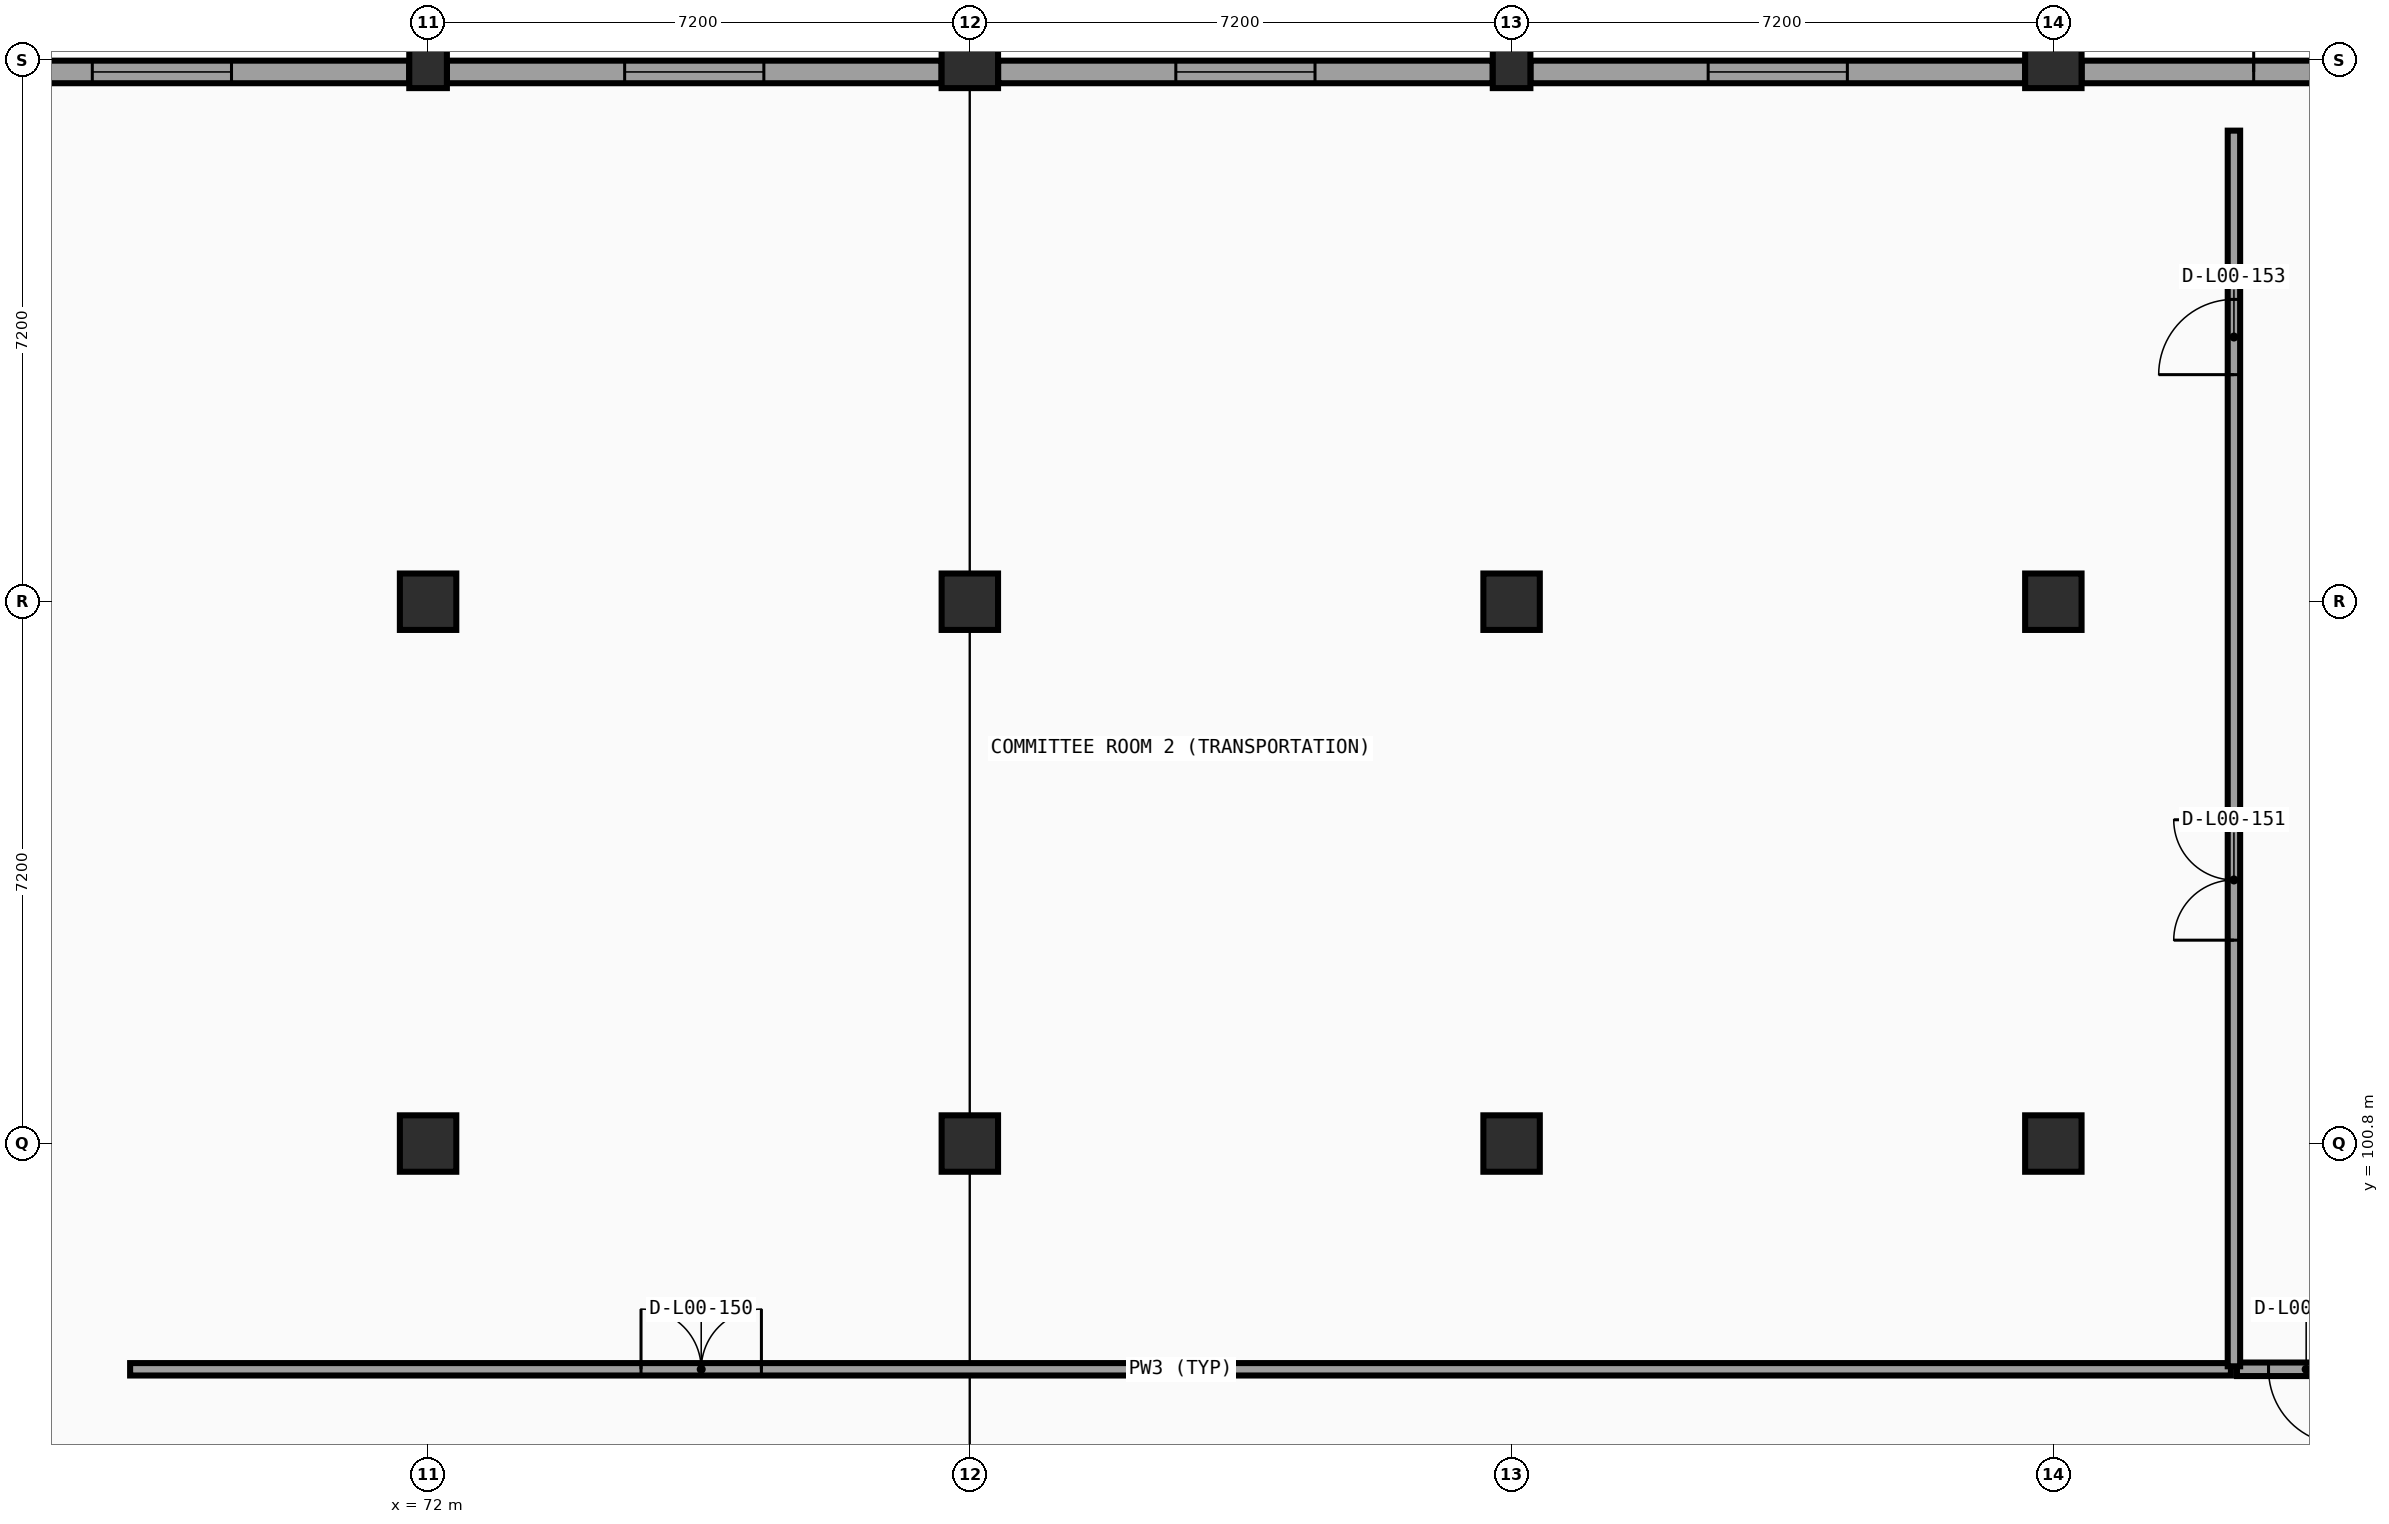
"""IFC4 building model, lengths in metres.
Left out: names, types, materials, properties, quantities, classifications, styles, units other than length and angle.
Written with IfcOpenShell. Run it as: python <this file> out.ifc"""

import sys

from ifc_helpers import new_model, si_unit, direction, frame, frame_2d, origin, origin_2d, place, context, subcontext, project, spatial, rectangle, extrude, element, fill, save


model = new_model("IFC4")
c1 = context("Model", 3, precision=1e-05, world=origin(), true_north=direction((0.0, 1.0)))
c2 = subcontext(c1, "Body", "Model", "MODEL_VIEW")
j1 = project(units=[si_unit("LENGTHUNIT", "METRE"), si_unit("PLANEANGLEUNIT", "RADIAN")], contexts=[c1])
p1 = place(None, origin())
s1 = spatial("IfcSite", under=j1, at=p1, CompositionType="ELEMENT")
p2 = place(p1, origin())
s2 = spatial("IfcBuilding", under=s1, at=p2, CompositionType="ELEMENT")
p3 = place(p2, origin())
s3 = spatial("IfcBuildingStorey", under=s2, at=p3, CompositionType="ELEMENT", Elevation=0.0)
for number, where, z_axis, x_axis in (
    (1, (72.0, 100.8, 0.0), (0.0, 0.0, 1.0), (1.0, 0.0, 0.0)),
    (2, (72.0, 108.0, 0.0), (0.0, 0.0, 1.0), (1.0, 0.0, 0.0)),
):
    element("IfcColumn", number, at=place(p3, frame(where, z_axis=z_axis, x_axis=x_axis)), inside=s3, PredefinedType="COLUMN", context=c2, shape_type="SweptSolid", body=[
        extrude(rectangle(XDim=0.75, YDim=0.75, at=origin_2d()), origin(), (0.0, 0.0, 1.0), 5.4),
    ])
p4 = place(p3, frame((72.0, 115.2, 0.0), z_axis=(0.0, 0.0, 1.0), x_axis=(1.0, 0.0, 0.0)))
e3 = element("IfcColumn", 3, at=p4, inside=s3, PredefinedType="PILASTER", context=c2, shape_type="SweptSolid", body=[
    extrude(rectangle(XDim=0.5, YDim=0.75, at=origin_2d()), origin(), (0.0, 0.0, 1.0), 5.4),
])
for number, where, z_axis, x_axis in (
    (4, (79.2, 100.8, 0.0), (0.0, 0.0, 1.0), (1.0, 0.0, 0.0)),
    (5, (79.2, 108.0, 0.0), (0.0, 0.0, 1.0), (1.0, 0.0, 0.0)),
    (6, (79.2, 115.2, 0.0), (0.0, 0.0, 1.0), (1.0, 0.0, 0.0)),
    (7, (86.4, 100.8, 0.0), (0.0, 0.0, 1.0), (1.0, 0.0, 0.0)),
    (8, (86.4, 108.0, 0.0), (0.0, 0.0, 1.0), (1.0, 0.0, 0.0)),
):
    element("IfcColumn", number, at=place(p3, frame(where, z_axis=z_axis, x_axis=x_axis)), inside=s3, PredefinedType="COLUMN", context=c2, shape_type="SweptSolid", body=[
        extrude(rectangle(XDim=0.75, YDim=0.75, at=origin_2d()), origin(), (0.0, 0.0, 1.0), 5.4),
    ])
p5 = place(p3, frame((86.4, 115.2, 0.0), z_axis=(0.0, 0.0, 1.0), x_axis=(1.0, 0.0, 0.0)))
e9 = element("IfcColumn", 9, at=p5, inside=s3, PredefinedType="PILASTER", context=c2, shape_type="SweptSolid", body=[
    extrude(rectangle(XDim=0.5, YDim=0.75, at=origin_2d()), origin(), (0.0, 0.0, 1.0), 5.4),
])
for number, where, z_axis, x_axis in (
    (10, (93.6, 100.8, 0.0), (0.0, 0.0, 1.0), (1.0, 0.0, 0.0)),
    (11, (93.6, 108.0, 0.0), (0.0, 0.0, 1.0), (1.0, 0.0, 0.0)),
    (12, (93.6, 115.2, 0.0), (0.0, 0.0, 1.0), (1.0, 0.0, 0.0)),
):
    element("IfcColumn", number, at=place(p3, frame(where, z_axis=z_axis, x_axis=x_axis)), inside=s3, PredefinedType="COLUMN", context=c2, shape_type="SweptSolid", body=[
        extrude(rectangle(XDim=0.75, YDim=0.75, at=origin_2d()), origin(), (0.0, 0.0, 1.0), 5.4),
    ])
p6 = place(p3, frame((65.176, 115.04, 0.0), z_axis=(0.0, 0.0, 1.0), x_axis=(1.0, 0.0, 0.0)))
e13 = element("IfcWall", 13, at=p6, inside=s3, PredefinedType="SOLIDWALL", context=c2, shape_type="SweptSolid", body=[
    extrude(rectangle(XDim=6.573, YDim=0.3, at=frame_2d((3.287, 0.0))), origin(), (0.0, 0.0, 1.0), 4.311),
])
p7 = place(p6, frame((2.362, 0.0, 0.85)))
e14 = element("IfcOpeningElement", 14, at=p7, cuts=e13, PredefinedType="OPENING", context=c2, shape_type="SweptSolid", body=[
    extrude(rectangle(XDim=1.85, YDim=2.1, at=frame_2d((0.925, 1.05))), frame((0.0, 0.16, 0.0), z_axis=(0.0, -1.0, 0.0), x_axis=(1.0, 0.0, 0.0)), (0.0, 0.0, 1.0), 0.32),
])
p8 = place(p3, frame((72.251, 115.04, 0.0), z_axis=(0.0, 0.0, 1.0), x_axis=(1.0, 0.0, 0.0)))
e15 = element("IfcWall", 15, at=p8, inside=s3, PredefinedType="SOLIDWALL", context=c2, shape_type="SweptSolid", body=[
    extrude(rectangle(XDim=6.573, YDim=0.3, at=frame_2d((3.287, 0.0))), origin(), (0.0, 0.0, 1.0), 4.311),
])
p9 = place(p8, frame((2.362, 0.0, 0.85)))
e16 = element("IfcOpeningElement", 16, at=p9, cuts=e15, PredefinedType="OPENING", context=c2, shape_type="SweptSolid", body=[
    extrude(rectangle(XDim=1.85, YDim=2.1, at=frame_2d((0.925, 1.05))), frame((0.0, 0.16, 0.0), z_axis=(0.0, -1.0, 0.0), x_axis=(1.0, 0.0, 0.0)), (0.0, 0.0, 1.0), 0.32),
])
p10 = place(p3, frame((79.576, 115.04, 0.0), z_axis=(0.0, 0.0, 1.0), x_axis=(1.0, 0.0, 0.0)))
e17 = element("IfcWall", 17, at=p10, inside=s3, PredefinedType="SOLIDWALL", context=c2, shape_type="SweptSolid", body=[
    extrude(rectangle(XDim=6.573, YDim=0.3, at=frame_2d((3.287, 0.0))), origin(), (0.0, 0.0, 1.0), 4.311),
])
p11 = place(p10, frame((2.362, 0.0, 0.85)))
e18 = element("IfcOpeningElement", 18, at=p11, cuts=e17, PredefinedType="OPENING", context=c2, shape_type="SweptSolid", body=[
    extrude(rectangle(XDim=1.85, YDim=2.1, at=frame_2d((0.925, 1.05))), frame((0.0, 0.16, 0.0), z_axis=(0.0, -1.0, 0.0), x_axis=(1.0, 0.0, 0.0)), (0.0, 0.0, 1.0), 0.32),
])
p12 = place(p3, frame((86.651, 115.04, 0.0), z_axis=(0.0, 0.0, 1.0), x_axis=(1.0, 0.0, 0.0)))
e19 = element("IfcWall", 19, at=p12, inside=s3, PredefinedType="SOLIDWALL", context=c2, shape_type="SweptSolid", body=[
    extrude(rectangle(XDim=6.573, YDim=0.3, at=frame_2d((3.287, 0.0))), origin(), (0.0, 0.0, 1.0), 4.311),
])
p13 = place(p12, frame((2.362, 0.0, 0.85)))
e20 = element("IfcOpeningElement", 20, at=p13, cuts=e19, PredefinedType="OPENING", context=c2, shape_type="SweptSolid", body=[
    extrude(rectangle(XDim=1.85, YDim=2.1, at=frame_2d((0.925, 1.05))), frame((0.0, 0.16, 0.0), z_axis=(0.0, -1.0, 0.0), x_axis=(1.0, 0.0, 0.0)), (0.0, 0.0, 1.0), 0.32),
])
p14 = place(p3, frame((93.976, 115.04, 0.0), z_axis=(0.0, 0.0, 1.0), x_axis=(1.0, 0.0, 0.0)))
e21 = element("IfcWall", 21, at=p14, inside=s3, PredefinedType="SOLIDWALL", context=c2, shape_type="SweptSolid", body=[
    extrude(rectangle(XDim=6.573, YDim=0.3, at=frame_2d((3.287, 0.0))), origin(), (0.0, 0.0, 1.0), 4.311),
])
p15 = place(p14, frame((2.287, 0.0, 0.0)))
e22 = element("IfcOpeningElement", 22, at=p15, cuts=e21, PredefinedType="OPENING", context=c2, shape_type="SweptSolid", body=[
    extrude(rectangle(XDim=2.0, YDim=2.25, at=frame_2d((1.0, 1.125))), frame((0.0, 0.16, 0.0), z_axis=(0.0, -1.0, 0.0), x_axis=(1.0, 0.0, 0.0)), (0.0, 0.0, 1.0), 0.32),
])
p16 = place(p3, frame((68.04, 97.8, 0.0), z_axis=(0.0, 0.0, 1.0), x_axis=(1.0, 0.0, 0.0)))
e23 = element("IfcWall", 23, at=p16, inside=s3, PredefinedType="PARTITIONING", context=c2, shape_type="SweptSolid", body=[
    extrude(rectangle(XDim=27.92, YDim=0.165, at=frame_2d((13.96, 0.0))), origin(), (0.0, 0.0, 1.0), 4.311),
])
p17 = place(p16, frame((6.79, 0.0, 0.0)))
e24 = element("IfcOpeningElement", 24, at=p17, cuts=e23, PredefinedType="OPENING", context=c2, shape_type="SweptSolid", body=[
    extrude(rectangle(XDim=1.6, YDim=2.1, at=frame_2d((0.8, 1.05))), frame((0.0, 0.093, 0.0), z_axis=(0.0, -1.0, 0.0), x_axis=(1.0, 0.0, 0.0)), (0.0, 0.0, 1.0), 0.185),
])
p18 = place(p3, frame((96.04, 97.8, 0.0), z_axis=(0.0, 0.0, 1.0), x_axis=(1.0, 0.0, 0.0)))
e25 = element("IfcWall", 25, at=p18, inside=s3, PredefinedType="PARTITIONING", context=c2, shape_type="SweptSolid", body=[
    extrude(rectangle(XDim=32.62, YDim=0.18, at=frame_2d((16.31, 0.0))), origin(), (0.0, 0.0, 1.0), 4.311),
])
p19 = place(p18, frame((0.42, 0.0, 0.0)))
e26 = element("IfcOpeningElement", 26, at=p19, cuts=e25, PredefinedType="OPENING", context=c2, shape_type="SweptSolid", body=[
    extrude(rectangle(XDim=1.0, YDim=2.1, at=frame_2d((0.5, 1.05))), frame((0.0, 0.1, 0.0), z_axis=(0.0, -1.0, 0.0), x_axis=(1.0, 0.0, 0.0)), (0.0, 0.0, 1.0), 0.2),
])
p20 = place(p3, frame((96.0, 97.84, 0.0), z_axis=(0.0, 0.0, 1.0), x_axis=(0.0, 1.0, 0.0)))
e27 = element("IfcWall", 27, at=p20, inside=s3, PredefinedType="PARTITIONING", context=c2, shape_type="SweptSolid", body=[
    extrude(rectangle(XDim=16.42, YDim=0.165, at=frame_2d((8.21, 0.0))), origin(), (0.0, 0.0, 1.0), 4.45),
])
p21 = place(p20, frame((5.663, 0.0, 0.0)))
e28 = element("IfcOpeningElement", 28, at=p21, cuts=e27, PredefinedType="OPENING", context=c2, shape_type="SweptSolid", body=[
    extrude(rectangle(XDim=1.6, YDim=2.1, at=frame_2d((0.8, 1.05))), frame((0.0, 0.093, 0.0), z_axis=(0.0, -1.0, 0.0), x_axis=(1.0, 0.0, 0.0)), (0.0, 0.0, 1.0), 0.185),
])
p22 = place(p20, frame((13.177, 0.0, 0.0)))
e29 = element("IfcOpeningElement", 29, at=p22, cuts=e27, PredefinedType="OPENING", context=c2, shape_type="SweptSolid", body=[
    extrude(rectangle(XDim=1.0, YDim=2.1, at=frame_2d((0.5, 1.05))), frame((0.0, 0.093, 0.0), z_axis=(0.0, -1.0, 0.0), x_axis=(1.0, 0.0, 0.0)), (0.0, 0.0, 1.0), 0.185),
])
p23 = place(p7, origin())
e30 = element("IfcWindow", 30, at=p23, inside=s3, PartitioningType="SINGLE_PANEL", PredefinedType="WINDOW", context=c2, shape_type="SweptSolid", body=[
    extrude(rectangle(XDim=1.85, YDim=2.1, at=frame_2d((0.925, 1.05))), frame((0.0, 0.03, 0.0), z_axis=(0.0, -1.0, 0.0), x_axis=(1.0, 0.0, 0.0)), (0.0, 0.0, 1.0), 0.06),
])
fill(e14, e30)
p24 = place(p9, origin())
e31 = element("IfcWindow", 31, at=p24, inside=s3, PartitioningType="SINGLE_PANEL", PredefinedType="WINDOW", context=c2, shape_type="SweptSolid", body=[
    extrude(rectangle(XDim=1.85, YDim=2.1, at=frame_2d((0.925, 1.05))), frame((0.0, 0.03, 0.0), z_axis=(0.0, -1.0, 0.0), x_axis=(1.0, 0.0, 0.0)), (0.0, 0.0, 1.0), 0.06),
])
fill(e16, e31)
p25 = place(p11, origin())
e32 = element("IfcWindow", 32, at=p25, inside=s3, PartitioningType="SINGLE_PANEL", PredefinedType="WINDOW", context=c2, shape_type="SweptSolid", body=[
    extrude(rectangle(XDim=1.85, YDim=2.1, at=frame_2d((0.925, 1.05))), frame((0.0, 0.03, 0.0), z_axis=(0.0, -1.0, 0.0), x_axis=(1.0, 0.0, 0.0)), (0.0, 0.0, 1.0), 0.06),
])
fill(e18, e32)
p26 = place(p13, origin())
e33 = element("IfcWindow", 33, at=p26, inside=s3, PartitioningType="SINGLE_PANEL", PredefinedType="WINDOW", context=c2, shape_type="SweptSolid", body=[
    extrude(rectangle(XDim=1.85, YDim=2.1, at=frame_2d((0.925, 1.05))), frame((0.0, 0.03, 0.0), z_axis=(0.0, -1.0, 0.0), x_axis=(1.0, 0.0, 0.0)), (0.0, 0.0, 1.0), 0.06),
])
fill(e20, e33)
p27 = place(p15, origin())
e34 = element("IfcDoor", 34, at=p27, inside=s3, OperationType="DOUBLE_DOOR_SINGLE_SWING", PredefinedType="DOOR", context=c2, shape_type="SweptSolid", body=[
    extrude(rectangle(XDim=2.0, YDim=2.25, at=frame_2d((1.0, 1.125))), frame((0.0, 0.025, 0.0), z_axis=(0.0, -1.0, 0.0), x_axis=(1.0, 0.0, 0.0)), (0.0, 0.0, 1.0), 0.05),
])
fill(e22, e34)
p28 = place(p17, origin())
e35 = element("IfcDoor", 35, at=p28, inside=s3, OperationType="DOUBLE_DOOR_SINGLE_SWING", PredefinedType="DOOR", context=c2, shape_type="SweptSolid", body=[
    extrude(rectangle(XDim=1.6, YDim=2.1, at=frame_2d((0.8, 1.05))), frame((0.0, 0.025, 0.0), z_axis=(0.0, -1.0, 0.0), x_axis=(1.0, 0.0, 0.0)), (0.0, 0.0, 1.0), 0.05),
])
fill(e24, e35)
p29 = place(p21, origin())
e36 = element("IfcDoor", 36, at=p29, inside=s3, OperationType="DOUBLE_DOOR_SINGLE_SWING", PredefinedType="DOOR", context=c2, shape_type="SweptSolid", body=[
    extrude(rectangle(XDim=1.6, YDim=2.1, at=frame_2d((0.8, 1.05))), frame((0.0, 0.025, 0.0), z_axis=(0.0, -1.0, 0.0), x_axis=(1.0, 0.0, 0.0)), (0.0, 0.0, 1.0), 0.05),
])
fill(e28, e36)
p30 = place(p19, origin())
e37 = element("IfcDoor", 37, at=p30, inside=s3, OperationType="SINGLE_SWING_RIGHT", PredefinedType="DOOR", context=c2, shape_type="SweptSolid", body=[
    extrude(rectangle(XDim=1.0, YDim=2.1, at=frame_2d((0.5, 1.05))), frame((0.0, 0.025, 0.0), z_axis=(0.0, -1.0, 0.0), x_axis=(1.0, 0.0, 0.0)), (0.0, 0.0, 1.0), 0.05),
])
fill(e26, e37)
p31 = place(p22, origin())
e38 = element("IfcDoor", 38, at=p31, inside=s3, OperationType="SINGLE_SWING_LEFT", PredefinedType="DOOR", context=c2, shape_type="SweptSolid", body=[
    extrude(rectangle(XDim=1.0, YDim=2.1, at=frame_2d((0.5, 1.05))), frame((0.0, 0.025, 0.0), z_axis=(0.0, -1.0, 0.0), x_axis=(1.0, 0.0, 0.0)), (0.0, 0.0, 1.0), 0.05),
])
fill(e29, e38)
save(model, sys.argv[1])
